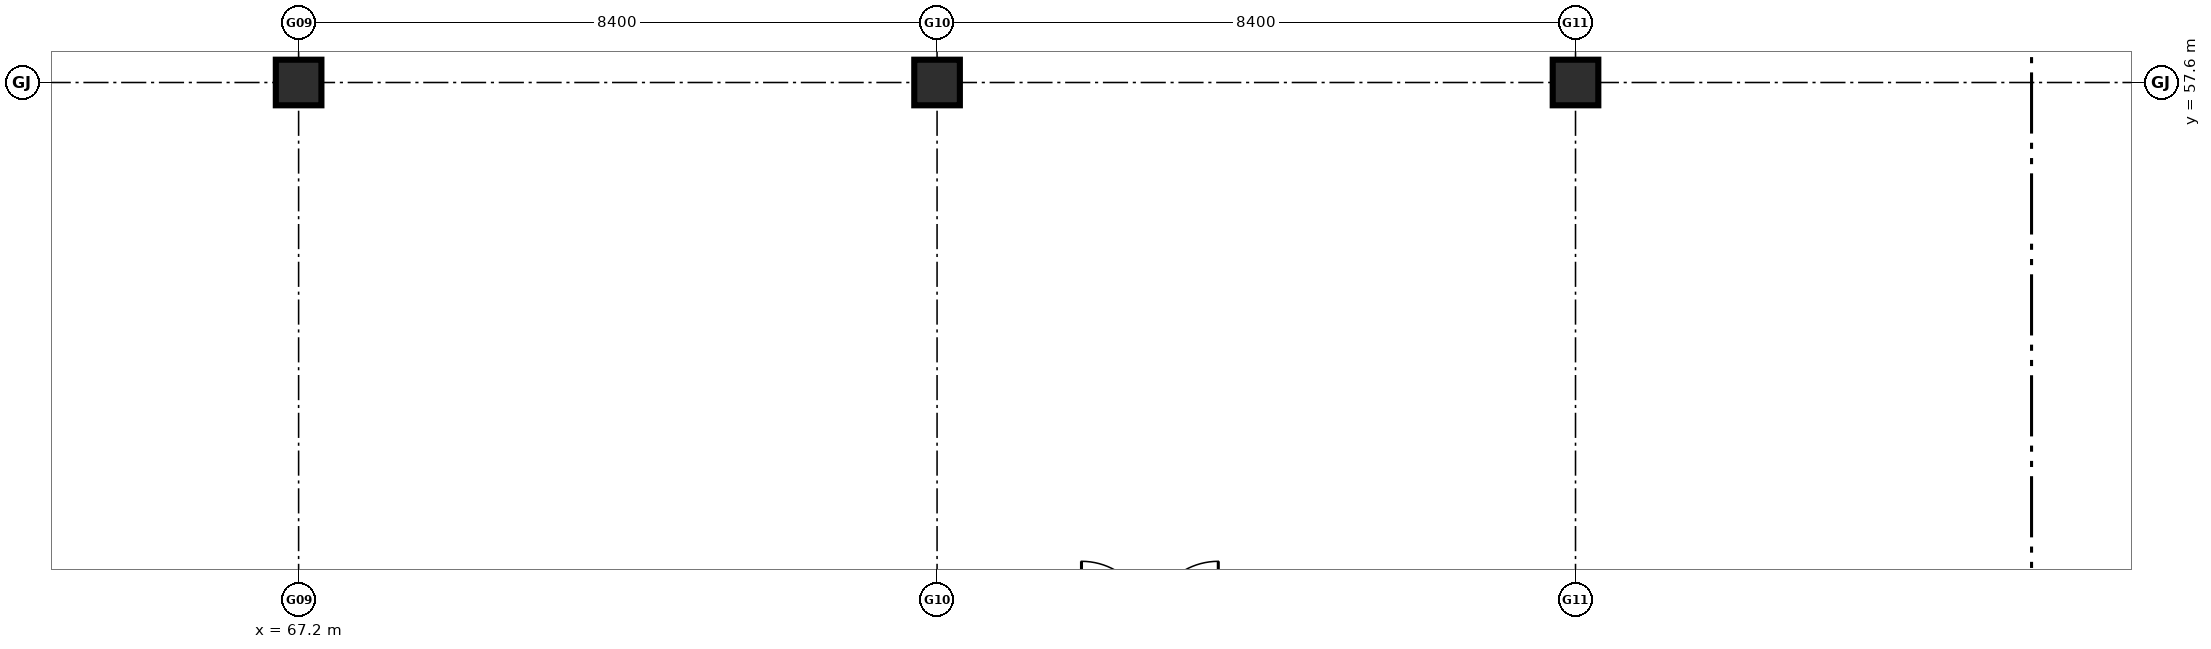
"""IFC4 building model, lengths in metres.
Left out: names, types, materials, properties, quantities, classifications, styles, units other than length and angle.
Written with IfcOpenShell. Run it as: python <this file> out.ifc"""

import sys

from ifc_helpers import new_model, si_unit, direction, frame, origin, origin_2d, place, context, subcontext, project, spatial, rectangle, extrude, element, save


model = new_model("IFC4")
c1 = context("Model", 3, precision=1e-05, world=origin(), true_north=direction((0.0, 1.0)))
c2 = subcontext(c1, "Body", "Model", "MODEL_VIEW")
j1 = project(units=[si_unit("LENGTHUNIT", "METRE"), si_unit("PLANEANGLEUNIT", "RADIAN")], contexts=[c1])
p1 = place(None, origin())
s1 = spatial("IfcSite", under=j1, at=p1, CompositionType="ELEMENT")
p2 = place(p1, origin())
s2 = spatial("IfcBuilding", under=s1, at=p2, CompositionType="ELEMENT")
p3 = place(p2, frame((0.0, 0.0, -4.8)))
s3 = spatial("IfcBuildingStorey", under=s2, at=p3, CompositionType="ELEMENT", Elevation=-4.8)
for number, where, z_axis, x_axis in (
    (1, (67.2, 57.6, 0.0), (0.0, 0.0, 1.0), (1.0, 0.0, 0.0)),
    (2, (75.6, 57.6, 0.0), (0.0, 0.0, 1.0), (1.0, 0.0, 0.0)),
    (3, (84.0, 57.6, 0.0), (0.0, 0.0, 1.0), (1.0, 0.0, 0.0)),
):
    element("IfcColumn", number, at=place(p3, frame(where, z_axis=z_axis, x_axis=x_axis)), inside=s3, PredefinedType="COLUMN", context=c2, shape_type="SweptSolid", body=[
        extrude(rectangle(XDim=0.6, YDim=0.6, at=origin_2d()), origin(), (0.0, 0.0, 1.0), 4.8),
    ])
save(model, sys.argv[1])
